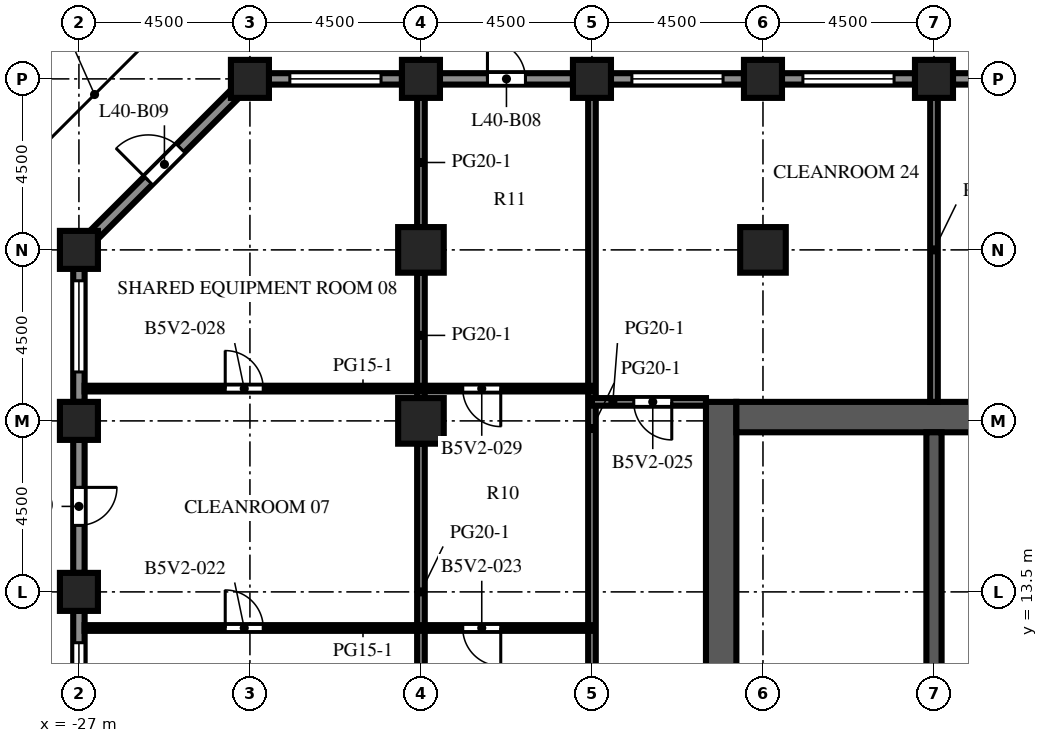
"""IFC4 building model, lengths in metres.
Left out: names, types, materials, properties, quantities, classifications, styles, units other than length and angle.
Written with IfcOpenShell. Run it as: python <this file> out.ifc"""

import sys

from ifc_helpers import new_model, si_unit, direction, frame, frame_2d, origin, origin_2d, place, context, subcontext, project, spatial, rectangle, extrude, element, fill, save


model = new_model("IFC4")
c1 = context("Model", 3, precision=1e-05, world=origin(), true_north=direction((0.0, 1.0)))
c2 = subcontext(c1, "Body", "Model", "MODEL_VIEW")
j1 = project(units=[si_unit("LENGTHUNIT", "METRE"), si_unit("PLANEANGLEUNIT", "RADIAN")], contexts=[c1])
p1 = place(None, origin())
s1 = spatial("IfcSite", under=j1, at=p1, CompositionType="ELEMENT")
p2 = place(p1, origin())
s2 = spatial("IfcBuilding", under=s1, at=p2, CompositionType="ELEMENT")
p3 = place(p2, frame((0.0, 0.0, 177.3)))
s3 = spatial("IfcBuildingStorey", under=s2, at=p3, CompositionType="ELEMENT", Elevation=177.3)
for number, where, z_axis, x_axis in (
    (1, (-27.0, 13.5, 0.0), (0.0, 0.0, 1.0), (1.0, 0.0, 0.0)),
    (2, (-27.0, 18.0, 0.0), (0.0, 0.0, 1.0), (1.0, 0.0, 0.0)),
    (3, (-27.0, 22.5, 0.0), (0.0, 0.0, 1.0), (1.0, 0.0, 0.0)),
    (4, (-22.5, 27.0, 0.0), (0.0, 0.0, 1.0), (1.0, 0.0, 0.0)),
    (5, (-18.0, 27.0, 0.0), (0.0, 0.0, 1.0), (1.0, 0.0, 0.0)),
    (6, (-13.5, 27.0, 0.0), (0.0, 0.0, 1.0), (1.0, 0.0, 0.0)),
    (7, (-9.0, 27.0, 0.0), (0.0, 0.0, 1.0), (1.0, 0.0, 0.0)),
    (8, (-4.5, 27.0, 0.0), (0.0, 0.0, 1.0), (1.0, 0.0, 0.0)),
):
    element("IfcColumn", number, at=place(p3, frame(where, z_axis=z_axis, x_axis=x_axis)), inside=s3, PredefinedType="COLUMN", context=c2, shape_type="SweptSolid", body=[
        extrude(rectangle(XDim=1.0, YDim=1.0, at=origin_2d()), origin(), (0.0, 0.0, 1.0), 4.1),
    ])
for number, where, z_axis, x_axis in (
    (9, (-18.0, 18.0, 0.0), (0.0, 0.0, 1.0), (1.0, 0.0, 0.0)),
    (10, (-18.0, 22.5, 0.0), (0.0, 0.0, 1.0), (1.0, 0.0, 0.0)),
    (11, (-9.0, 22.5, 0.0), (0.0, 0.0, 1.0), (1.0, 0.0, 0.0)),
):
    element("IfcColumn", number, at=place(p3, frame(where, z_axis=z_axis, x_axis=x_axis)), inside=s3, PredefinedType="COLUMN", context=c2, shape_type="SweptSolid", body=[
        extrude(rectangle(XDim=1.2, YDim=1.2, at=origin_2d()), origin(), (0.0, 0.0, 1.0), 4.1),
    ])
p4 = place(p3, frame((-10.1, -9.0, 0.0), z_axis=(0.0, 0.0, 1.0), x_axis=(0.0, 1.0, 0.0)))
e12 = element("IfcWall", 12, at=p4, inside=s3, PredefinedType="SHEAR", context=c2, shape_type="SweptSolid", body=[
    extrude(rectangle(XDim=27.5, YDim=0.8, at=frame_2d((13.75, 0.0))), origin(), (0.0, 0.0, 1.0), 4.1),
])
p5 = place(p4, frame((12.55, 0.0, 0.0)))
e13 = element("IfcOpeningElement", 13, at=p5, cuts=e12, PredefinedType="OPENING", context=c2, shape_type="SweptSolid", body=[
    extrude(rectangle(XDim=2.4, YDim=2.4, at=frame_2d((1.2, 1.2))), frame((0.0, 0.41, 0.0), z_axis=(0.0, -1.0, 0.0), x_axis=(1.0, 0.0, 0.0)), (0.0, 0.0, 1.0), 0.82),
])
p6 = place(p4, frame((6.825, 0.0, 0.0)))
e14 = element("IfcOpeningElement", 14, at=p6, cuts=e12, PredefinedType="OPENING", context=c2, shape_type="SweptSolid", body=[
    extrude(rectangle(XDim=1.2, YDim=2.1, at=frame_2d((0.6, 1.05))), frame((0.0, 0.41, 0.0), z_axis=(0.0, -1.0, 0.0), x_axis=(1.0, 0.0, 0.0)), (0.0, 0.0, 1.0), 0.82),
])
p7 = place(p4, frame((19.475, 0.0, 0.0)))
e15 = element("IfcOpeningElement", 15, at=p7, cuts=e12, PredefinedType="OPENING", context=c2, shape_type="SweptSolid", body=[
    extrude(rectangle(XDim=1.2, YDim=2.1, at=frame_2d((0.6, 1.05))), frame((0.0, 0.41, 0.0), z_axis=(0.0, -1.0, 0.0), x_axis=(1.0, 0.0, 0.0)), (0.0, 0.0, 1.0), 0.82),
])
p8 = place(p3, frame((-9.7, 18.1, 0.0), z_axis=(0.0, 0.0, 1.0), x_axis=(1.0, 0.0, 0.0)))
e16 = element("IfcWall", 16, at=p8, inside=s3, PredefinedType="SHEAR", context=c2, shape_type="SweptSolid", body=[
    extrude(rectangle(XDim=10.4, YDim=0.8, at=frame_2d((5.2, 0.0))), origin(), (0.0, 0.0, 1.0), 4.1),
])
p9 = place(p3, frame((-4.5, 10.2, 0.0), z_axis=(0.0, 0.0, 1.0), x_axis=(0.0, 1.0, 0.0)))
e17 = element("IfcWall", 17, at=p9, inside=s3, PredefinedType="SHEAR", context=c2, shape_type="SweptSolid", body=[
    extrude(rectangle(XDim=7.5, YDim=0.4, at=frame_2d((3.75, 0.0))), origin(), (0.0, 0.0, 1.0), 4.1),
])
p10 = place(p3, frame((-4.0, 27.0, 0.0), z_axis=(0.0, 0.0, 1.0), x_axis=(1.0, 0.0, 0.0)))
e18 = element("IfcWall", 18, at=p10, inside=s3, PredefinedType="SOLIDWALL", context=c2, shape_type="SweptSolid", body=[
    extrude(rectangle(XDim=3.5, YDim=0.3, at=frame_2d((1.75, 0.0))), origin(), (0.0, 0.0, 1.0), 2.85),
])
p11 = place(p10, frame((0.55, 0.0, 0.8)))
e19 = element("IfcOpeningElement", 19, at=p11, cuts=e18, PredefinedType="OPENING", context=c2, shape_type="SweptSolid", body=[
    extrude(rectangle(XDim=2.4, YDim=1.7, at=frame_2d((1.2, 0.85))), frame((0.0, 0.16, 0.0), z_axis=(0.0, -1.0, 0.0), x_axis=(1.0, 0.0, 0.0)), (0.0, 0.0, 1.0), 0.32),
])
p12 = place(p3, frame((-8.5, 27.0, 0.0), z_axis=(0.0, 0.0, 1.0), x_axis=(1.0, 0.0, 0.0)))
e20 = element("IfcWall", 20, at=p12, inside=s3, PredefinedType="SOLIDWALL", context=c2, shape_type="SweptSolid", body=[
    extrude(rectangle(XDim=3.5, YDim=0.3, at=frame_2d((1.75, 0.0))), origin(), (0.0, 0.0, 1.0), 2.85),
])
p13 = place(p12, frame((0.55, 0.0, 0.8)))
e21 = element("IfcOpeningElement", 21, at=p13, cuts=e20, PredefinedType="OPENING", context=c2, shape_type="SweptSolid", body=[
    extrude(rectangle(XDim=2.4, YDim=1.7, at=frame_2d((1.2, 0.85))), frame((0.0, 0.16, 0.0), z_axis=(0.0, -1.0, 0.0), x_axis=(1.0, 0.0, 0.0)), (0.0, 0.0, 1.0), 0.32),
])
p14 = place(p3, frame((-13.0, 27.0, 0.0), z_axis=(0.0, 0.0, 1.0), x_axis=(1.0, 0.0, 0.0)))
e22 = element("IfcWall", 22, at=p14, inside=s3, PredefinedType="SOLIDWALL", context=c2, shape_type="SweptSolid", body=[
    extrude(rectangle(XDim=3.5, YDim=0.3, at=frame_2d((1.75, 0.0))), origin(), (0.0, 0.0, 1.0), 2.85),
])
p15 = place(p14, frame((0.55, 0.0, 0.8)))
e23 = element("IfcOpeningElement", 23, at=p15, cuts=e22, PredefinedType="OPENING", context=c2, shape_type="SweptSolid", body=[
    extrude(rectangle(XDim=2.4, YDim=1.7, at=frame_2d((1.2, 0.85))), frame((0.0, 0.16, 0.0), z_axis=(0.0, -1.0, 0.0), x_axis=(1.0, 0.0, 0.0)), (0.0, 0.0, 1.0), 0.32),
])
p16 = place(p3, frame((-17.5, 27.0, 0.0), z_axis=(0.0, 0.0, 1.0), x_axis=(1.0, 0.0, 0.0)))
e24 = element("IfcWall", 24, at=p16, inside=s3, PredefinedType="SOLIDWALL", context=c2, shape_type="SweptSolid", body=[
    extrude(rectangle(XDim=3.5, YDim=0.3, at=frame_2d((1.75, 0.0))), origin(), (0.0, 0.0, 1.0), 2.85),
])
p17 = place(p16, frame((1.25, 0.0, 0.0)))
e25 = element("IfcOpeningElement", 25, at=p17, cuts=e24, PredefinedType="OPENING", context=c2, shape_type="SweptSolid", body=[
    extrude(rectangle(XDim=1.0, YDim=2.2, at=frame_2d((0.5, 1.1))), frame((0.0, 0.16, 0.0), z_axis=(0.0, -1.0, 0.0), x_axis=(1.0, 0.0, 0.0)), (0.0, 0.0, 1.0), 0.32),
])
p18 = place(p3, frame((-22.0, 27.0, 0.0), z_axis=(0.0, 0.0, 1.0), x_axis=(1.0, 0.0, 0.0)))
e26 = element("IfcWall", 26, at=p18, inside=s3, PredefinedType="SOLIDWALL", context=c2, shape_type="SweptSolid", body=[
    extrude(rectangle(XDim=3.5, YDim=0.3, at=frame_2d((1.75, 0.0))), origin(), (0.0, 0.0, 1.0), 2.85),
])
p19 = place(p18, frame((0.55, 0.0, 0.8)))
e27 = element("IfcOpeningElement", 27, at=p19, cuts=e26, PredefinedType="OPENING", context=c2, shape_type="SweptSolid", body=[
    extrude(rectangle(XDim=2.4, YDim=1.7, at=frame_2d((1.2, 0.85))), frame((0.0, 0.16, 0.0), z_axis=(0.0, -1.0, 0.0), x_axis=(1.0, 0.0, 0.0)), (0.0, 0.0, 1.0), 0.32),
])
p20 = place(p3, frame((-26.606, 22.894, 0.0), z_axis=(0.0, 0.0, 1.0), x_axis=(0.707106781187, 0.707106781187, 0.0)))
e28 = element("IfcWall", 28, at=p20, inside=s3, PredefinedType="SOLIDWALL", context=c2, shape_type="SweptSolid", body=[
    extrude(rectangle(XDim=5.25, YDim=0.3, at=frame_2d((2.625, 0.0))), origin(), (0.0, 0.0, 1.0), 2.85),
])
p21 = place(p20, frame((2.025, 0.0, 0.0)))
e29 = element("IfcOpeningElement", 29, at=p21, cuts=e28, PredefinedType="OPENING", context=c2, shape_type="SweptSolid", body=[
    extrude(rectangle(XDim=1.2, YDim=2.2, at=frame_2d((0.6, 1.1))), frame((0.0, 0.16, 0.0), z_axis=(0.0, -1.0, 0.0), x_axis=(1.0, 0.0, 0.0)), (0.0, 0.0, 1.0), 0.32),
])
p22 = place(p3, frame((-27.0, 18.5, 0.0), z_axis=(0.0, 0.0, 1.0), x_axis=(0.0, 1.0, 0.0)))
e30 = element("IfcWall", 30, at=p22, inside=s3, PredefinedType="SOLIDWALL", context=c2, shape_type="SweptSolid", body=[
    extrude(rectangle(XDim=3.5, YDim=0.3, at=frame_2d((1.75, 0.0))), origin(), (0.0, 0.0, 1.0), 2.85),
])
p23 = place(p22, frame((0.788, 0.0, 0.8)))
e31 = element("IfcOpeningElement", 31, at=p23, cuts=e30, PredefinedType="OPENING", context=c2, shape_type="SweptSolid", body=[
    extrude(rectangle(XDim=2.4, YDim=1.7, at=frame_2d((1.2, 0.85))), frame((0.0, 0.16, 0.0), z_axis=(0.0, -1.0, 0.0), x_axis=(1.0, 0.0, 0.0)), (0.0, 0.0, 1.0), 0.32),
])
p24 = place(p3, frame((-27.0, 14.0, 0.0), z_axis=(0.0, 0.0, 1.0), x_axis=(0.0, 1.0, 0.0)))
e32 = element("IfcWall", 32, at=p24, inside=s3, PredefinedType="SOLIDWALL", context=c2, shape_type="SweptSolid", body=[
    extrude(rectangle(XDim=3.5, YDim=0.3, at=frame_2d((1.75, 0.0))), origin(), (0.0, 0.0, 1.0), 2.85),
])
p25 = place(p24, frame((1.25, 0.0, 0.0)))
e33 = element("IfcOpeningElement", 33, at=p25, cuts=e32, PredefinedType="OPENING", context=c2, shape_type="SweptSolid", body=[
    extrude(rectangle(XDim=1.0, YDim=2.2, at=frame_2d((0.5, 1.1))), frame((0.0, 0.16, 0.0), z_axis=(0.0, -1.0, 0.0), x_axis=(1.0, 0.0, 0.0)), (0.0, 0.0, 1.0), 0.32),
])
p26 = place(p3, frame((-27.0, 9.5, 0.0), z_axis=(0.0, 0.0, 1.0), x_axis=(0.0, 1.0, 0.0)))
e34 = element("IfcWall", 34, at=p26, inside=s3, PredefinedType="SOLIDWALL", context=c2, shape_type="SweptSolid", body=[
    extrude(rectangle(XDim=3.5, YDim=0.3, at=frame_2d((1.75, 0.0))), origin(), (0.0, 0.0, 1.0), 2.85),
])
p27 = place(p26, frame((0.262, 0.0, 0.8)))
e35 = element("IfcOpeningElement", 35, at=p27, cuts=e34, PredefinedType="OPENING", context=c2, shape_type="SweptSolid", body=[
    extrude(rectangle(XDim=2.4, YDim=1.7, at=frame_2d((1.2, 0.85))), frame((0.0, 0.16, 0.0), z_axis=(0.0, -1.0, 0.0), x_axis=(1.0, 0.0, 0.0)), (0.0, 0.0, 1.0), 0.32),
])
for number, where, z_axis, x_axis in (
    (36, (-4.3, 12.45, 0.0), (0.0, 0.0, 1.0), (1.0, 0.0, 0.0)),
    (37, (-4.3, 15.075, 0.0), (0.0, 0.0, 1.0), (1.0, 0.0, 0.0)),
):
    element("IfcWall", number, at=place(p3, frame(where, z_axis=z_axis, x_axis=x_axis)), inside=s3, PredefinedType="PARTITIONING", context=c2, shape_type="SweptSolid", body=[
        extrude(rectangle(XDim=3.7, YDim=0.1, at=frame_2d((1.85, 0.0))), origin(), (0.0, 0.0, 1.0), 3.65),
    ])
p28 = place(p3, frame((-18.0, 9.6, 0.0), z_axis=(0.0, 0.0, 1.0), x_axis=(0.0, 1.0, 0.0)))
e38 = element("IfcWall", 38, at=p28, inside=s3, PredefinedType="PARTITIONING", context=c2, shape_type="SweptSolid", body=[
    extrude(rectangle(XDim=7.8, YDim=0.2, at=frame_2d((3.9, 0.0))), origin(), (0.0, 0.0, 1.0), 3.65),
])
p29 = place(p3, frame((-18.0, 18.6, 0.0), z_axis=(0.0, 0.0, 1.0), x_axis=(0.0, 1.0, 0.0)))
e39 = element("IfcWall", 39, at=p29, inside=s3, PredefinedType="PARTITIONING", context=c2, shape_type="SweptSolid", body=[
    extrude(rectangle(XDim=3.3, YDim=0.2, at=frame_2d((1.65, 0.0))), origin(), (0.0, 0.0, 1.0), 3.65),
])
p30 = place(p3, frame((-18.0, 23.1, 0.0), z_axis=(0.0, 0.0, 1.0), x_axis=(0.0, 1.0, 0.0)))
e40 = element("IfcWall", 40, at=p30, inside=s3, PredefinedType="PARTITIONING", context=c2, shape_type="SweptSolid", body=[
    extrude(rectangle(XDim=3.4, YDim=0.2, at=frame_2d((1.7, 0.0))), origin(), (0.0, 0.0, 1.0), 3.65),
])
p31 = place(p3, frame((-13.5, 6.25, 0.0), z_axis=(0.0, 0.0, 1.0), x_axis=(0.0, 1.0, 0.0)))
e41 = element("IfcWall", 41, at=p31, inside=s3, PredefinedType="PARTITIONING", context=c2, shape_type="SweptSolid", body=[
    extrude(rectangle(XDim=20.25, YDim=0.2, at=frame_2d((10.125, 0.0))), origin(), (0.0, 0.0, 1.0), 3.65),
])
p32 = place(p31, frame((1.85, 0.0, 0.0)))
e42 = element("IfcOpeningElement", 42, at=p32, cuts=e41, PredefinedType="OPENING", context=c2, shape_type="SweptSolid", body=[
    extrude(rectangle(XDim=1.0, YDim=2.1, at=frame_2d((0.5, 1.05))), frame((0.0, 0.11, 0.0), z_axis=(0.0, -1.0, 0.0), x_axis=(1.0, 0.0, 0.0)), (0.0, 0.0, 1.0), 0.22),
])
p33 = place(p3, frame((-4.5, 18.5, 0.0), z_axis=(0.0, 0.0, 1.0), x_axis=(0.0, 1.0, 0.0)))
e43 = element("IfcWall", 43, at=p33, inside=s3, PredefinedType="PARTITIONING", context=c2, shape_type="SweptSolid", body=[
    extrude(rectangle(XDim=8.0, YDim=0.2, at=frame_2d((4.0, 0.0))), origin(), (0.0, 0.0, 1.0), 3.65),
])
p34 = place(p3, frame((-26.85, 12.55, 0.0), z_axis=(0.0, 0.0, 1.0), x_axis=(1.0, 0.0, 0.0)))
e44 = element("IfcWall", 44, at=p34, inside=s3, PredefinedType="PARTITIONING", context=c2, shape_type="SweptSolid", body=[
    extrude(rectangle(XDim=13.35, YDim=0.15, at=frame_2d((6.675, 0.0))), origin(), (0.0, 0.0, 1.0), 3.65),
])
p35 = place(p34, frame((3.7, 0.0, 0.0)))
e45 = element("IfcOpeningElement", 45, at=p35, cuts=e44, PredefinedType="OPENING", context=c2, shape_type="SweptSolid", body=[
    extrude(rectangle(XDim=1.0, YDim=2.1, at=frame_2d((0.5, 1.05))), frame((0.0, 0.085, 0.0), z_axis=(0.0, -1.0, 0.0), x_axis=(1.0, 0.0, 0.0)), (0.0, 0.0, 1.0), 0.17),
])
p36 = place(p34, frame((9.95, 0.0, 0.0)))
e46 = element("IfcOpeningElement", 46, at=p36, cuts=e44, PredefinedType="OPENING", context=c2, shape_type="SweptSolid", body=[
    extrude(rectangle(XDim=1.0, YDim=2.1, at=frame_2d((0.5, 1.05))), frame((0.0, 0.085, 0.0), z_axis=(0.0, -1.0, 0.0), x_axis=(1.0, 0.0, 0.0)), (0.0, 0.0, 1.0), 0.17),
])
p37 = place(p3, frame((-13.5, 18.5, 0.0), z_axis=(0.0, 0.0, 1.0), x_axis=(1.0, 0.0, 0.0)))
e47 = element("IfcWall", 47, at=p37, inside=s3, PredefinedType="PARTITIONING", context=c2, shape_type="SweptSolid", body=[
    extrude(rectangle(XDim=3.0, YDim=0.2, at=frame_2d((1.5, 0.0))), origin(), (0.0, 0.0, 1.0), 3.65),
])
p38 = place(p37, frame((1.1, 0.0, 0.0)))
e48 = element("IfcOpeningElement", 48, at=p38, cuts=e47, PredefinedType="OPENING", context=c2, shape_type="SweptSolid", body=[
    extrude(rectangle(XDim=1.0, YDim=2.1, at=frame_2d((0.5, 1.05))), frame((0.0, 0.11, 0.0), z_axis=(0.0, -1.0, 0.0), x_axis=(1.0, 0.0, 0.0)), (0.0, 0.0, 1.0), 0.22),
])
p39 = place(p3, frame((-26.85, 18.85, 0.0), z_axis=(0.0, 0.0, 1.0), x_axis=(1.0, 0.0, 0.0)))
e49 = element("IfcWall", 49, at=p39, inside=s3, PredefinedType="PARTITIONING", context=c2, shape_type="SweptSolid", body=[
    extrude(rectangle(XDim=13.35, YDim=0.15, at=frame_2d((6.675, 0.0))), origin(), (0.0, 0.0, 1.0), 3.65),
])
p40 = place(p39, frame((3.7, 0.0, 0.0)))
e50 = element("IfcOpeningElement", 50, at=p40, cuts=e49, PredefinedType="OPENING", context=c2, shape_type="SweptSolid", body=[
    extrude(rectangle(XDim=1.0, YDim=2.1, at=frame_2d((0.5, 1.05))), frame((0.0, 0.085, 0.0), z_axis=(0.0, -1.0, 0.0), x_axis=(1.0, 0.0, 0.0)), (0.0, 0.0, 1.0), 0.17),
])
p41 = place(p39, frame((9.95, 0.0, 0.0)))
e51 = element("IfcOpeningElement", 51, at=p41, cuts=e49, PredefinedType="OPENING", context=c2, shape_type="SweptSolid", body=[
    extrude(rectangle(XDim=1.0, YDim=2.1, at=frame_2d((0.5, 1.05))), frame((0.0, 0.085, 0.0), z_axis=(0.0, -1.0, 0.0), x_axis=(1.0, 0.0, 0.0)), (0.0, 0.0, 1.0), 0.17),
])
p42 = place(p13, origin())
e52 = element("IfcWindow", 52, at=p42, inside=s3, PartitioningType="SINGLE_PANEL", PredefinedType="WINDOW", context=c2, shape_type="SweptSolid", body=[
    extrude(rectangle(XDim=2.4, YDim=1.7, at=frame_2d((1.2, 0.85))), frame((0.0, 0.03, 0.0), z_axis=(0.0, -1.0, 0.0), x_axis=(1.0, 0.0, 0.0)), (0.0, 0.0, 1.0), 0.06),
])
fill(e21, e52)
p43 = place(p15, origin())
e53 = element("IfcWindow", 53, at=p43, inside=s3, PartitioningType="SINGLE_PANEL", PredefinedType="WINDOW", context=c2, shape_type="SweptSolid", body=[
    extrude(rectangle(XDim=2.4, YDim=1.7, at=frame_2d((1.2, 0.85))), frame((0.0, 0.03, 0.0), z_axis=(0.0, -1.0, 0.0), x_axis=(1.0, 0.0, 0.0)), (0.0, 0.0, 1.0), 0.06),
])
fill(e23, e53)
p44 = place(p17, origin())
e54 = element("IfcDoor", 54, at=p44, inside=s3, OperationType="SINGLE_SWING_LEFT", PredefinedType="DOOR", context=c2, shape_type="SweptSolid", body=[
    extrude(rectangle(XDim=1.0, YDim=2.2, at=frame_2d((0.5, 1.1))), frame((0.0, 0.025, 0.0), z_axis=(0.0, -1.0, 0.0), x_axis=(1.0, 0.0, 0.0)), (0.0, 0.0, 1.0), 0.05),
])
fill(e25, e54)
p45 = place(p19, origin())
e55 = element("IfcWindow", 55, at=p45, inside=s3, PartitioningType="SINGLE_PANEL", PredefinedType="WINDOW", context=c2, shape_type="SweptSolid", body=[
    extrude(rectangle(XDim=2.4, YDim=1.7, at=frame_2d((1.2, 0.85))), frame((0.0, 0.03, 0.0), z_axis=(0.0, -1.0, 0.0), x_axis=(1.0, 0.0, 0.0)), (0.0, 0.0, 1.0), 0.06),
])
fill(e27, e55)
p46 = place(p21, origin())
e56 = element("IfcDoor", 56, at=p46, inside=s3, OperationType="SINGLE_SWING_LEFT", PredefinedType="DOOR", context=c2, shape_type="SweptSolid", body=[
    extrude(rectangle(XDim=1.2, YDim=2.2, at=frame_2d((0.6, 1.1))), frame((0.0, 0.025, 0.0), z_axis=(0.0, -1.0, 0.0), x_axis=(1.0, 0.0, 0.0)), (0.0, 0.0, 1.0), 0.05),
])
fill(e29, e56)
p47 = place(p23, origin())
e57 = element("IfcWindow", 57, at=p47, inside=s3, PartitioningType="SINGLE_PANEL", PredefinedType="WINDOW", context=c2, shape_type="SweptSolid", body=[
    extrude(rectangle(XDim=2.4, YDim=1.7, at=frame_2d((1.2, 0.85))), frame((0.0, 0.03, 0.0), z_axis=(0.0, -1.0, 0.0), x_axis=(1.0, 0.0, 0.0)), (0.0, 0.0, 1.0), 0.06),
])
fill(e31, e57)
p48 = place(p25, origin())
e58 = element("IfcDoor", 58, at=p48, inside=s3, OperationType="SINGLE_SWING_RIGHT", PredefinedType="DOOR", context=c2, shape_type="SweptSolid", body=[
    extrude(rectangle(XDim=1.0, YDim=2.2, at=frame_2d((0.5, 1.1))), frame((0.0, 0.025, 0.0), z_axis=(0.0, -1.0, 0.0), x_axis=(1.0, 0.0, 0.0)), (0.0, 0.0, 1.0), 0.05),
])
fill(e33, e58)
p49 = place(p27, origin())
e59 = element("IfcWindow", 59, at=p49, inside=s3, PartitioningType="SINGLE_PANEL", PredefinedType="WINDOW", context=c2, shape_type="SweptSolid", body=[
    extrude(rectangle(XDim=2.4, YDim=1.7, at=frame_2d((1.2, 0.85))), frame((0.0, 0.03, 0.0), z_axis=(0.0, -1.0, 0.0), x_axis=(1.0, 0.0, 0.0)), (0.0, 0.0, 1.0), 0.06),
])
fill(e35, e59)
p50 = place(p7, origin())
e60 = element("IfcDoor", 60, at=p50, inside=s3, OperationType="SINGLE_SWING_LEFT", PredefinedType="DOOR", context=c2, shape_type="SweptSolid", body=[
    extrude(rectangle(XDim=1.2, YDim=2.1, at=frame_2d((0.6, 1.05))), frame((0.0, 0.025, 0.0), z_axis=(0.0, -1.0, 0.0), x_axis=(1.0, 0.0, 0.0)), (0.0, 0.0, 1.0), 0.05),
])
fill(e15, e60)
p51 = place(p35, origin())
e61 = element("IfcDoor", 61, at=p51, inside=s3, OperationType="SINGLE_SWING_LEFT", PredefinedType="DOOR", context=c2, shape_type="SweptSolid", body=[
    extrude(rectangle(XDim=1.0, YDim=2.1, at=frame_2d((0.5, 1.05))), frame((0.0, 0.025, 0.0), z_axis=(0.0, -1.0, 0.0), x_axis=(1.0, 0.0, 0.0)), (0.0, 0.0, 1.0), 0.05),
])
fill(e45, e61)
p52 = place(p36, origin())
e62 = element("IfcDoor", 62, at=p52, inside=s3, OperationType="SINGLE_SWING_RIGHT", PredefinedType="DOOR", context=c2, shape_type="SweptSolid", body=[
    extrude(rectangle(XDim=1.0, YDim=2.1, at=frame_2d((0.5, 1.05))), frame((0.0, 0.025, 0.0), z_axis=(0.0, -1.0, 0.0), x_axis=(1.0, 0.0, 0.0)), (0.0, 0.0, 1.0), 0.05),
])
fill(e46, e62)
p53 = place(p38, origin())
e63 = element("IfcDoor", 63, at=p53, inside=s3, OperationType="SINGLE_SWING_RIGHT", PredefinedType="DOOR", context=c2, shape_type="SweptSolid", body=[
    extrude(rectangle(XDim=1.0, YDim=2.1, at=frame_2d((0.5, 1.05))), frame((0.0, 0.025, 0.0), z_axis=(0.0, -1.0, 0.0), x_axis=(1.0, 0.0, 0.0)), (0.0, 0.0, 1.0), 0.05),
])
fill(e48, e63)
p54 = place(p40, origin())
e64 = element("IfcDoor", 64, at=p54, inside=s3, OperationType="SINGLE_SWING_LEFT", PredefinedType="DOOR", context=c2, shape_type="SweptSolid", body=[
    extrude(rectangle(XDim=1.0, YDim=2.1, at=frame_2d((0.5, 1.05))), frame((0.0, 0.025, 0.0), z_axis=(0.0, -1.0, 0.0), x_axis=(1.0, 0.0, 0.0)), (0.0, 0.0, 1.0), 0.05),
])
fill(e50, e64)
p55 = place(p41, origin())
e65 = element("IfcDoor", 65, at=p55, inside=s3, OperationType="SINGLE_SWING_RIGHT", PredefinedType="DOOR", context=c2, shape_type="SweptSolid", body=[
    extrude(rectangle(XDim=1.0, YDim=2.1, at=frame_2d((0.5, 1.05))), frame((0.0, 0.025, 0.0), z_axis=(0.0, -1.0, 0.0), x_axis=(1.0, 0.0, 0.0)), (0.0, 0.0, 1.0), 0.05),
])
fill(e51, e65)
save(model, sys.argv[1])
